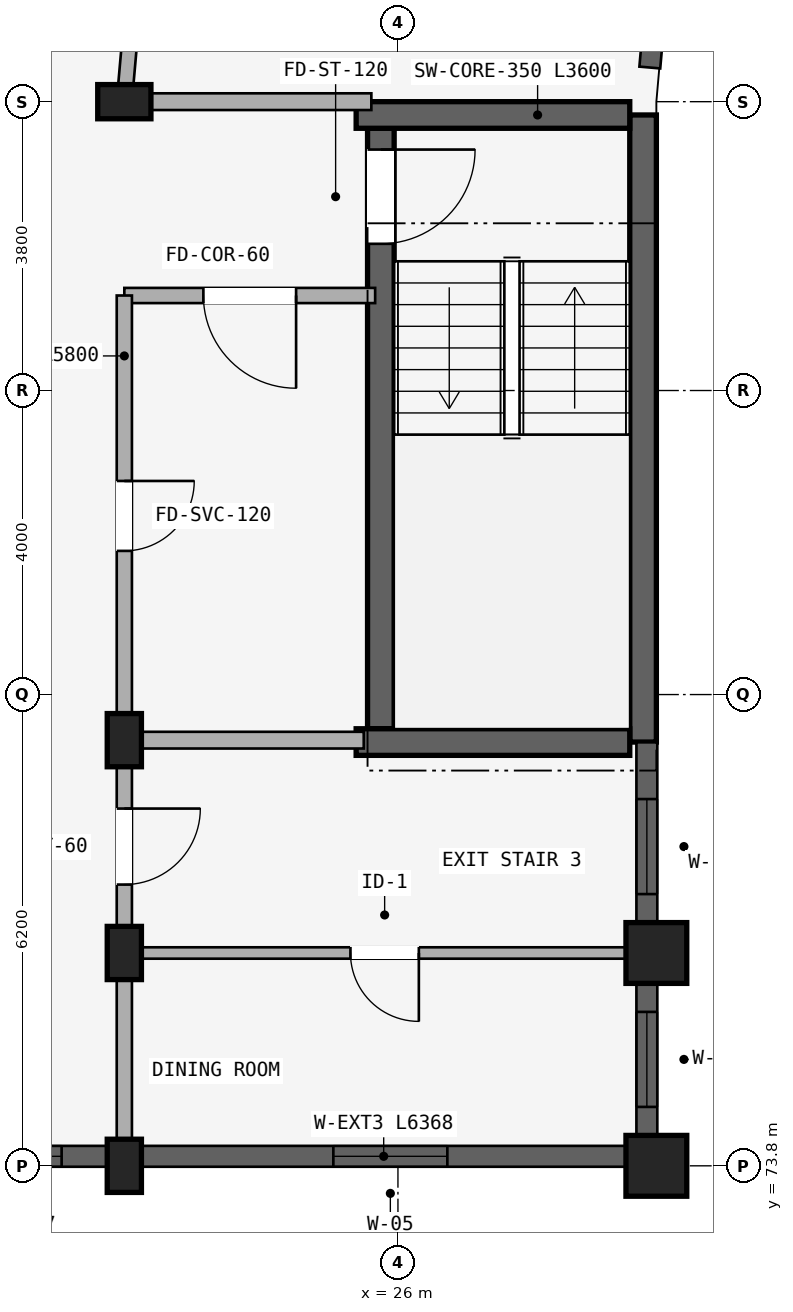
"""IFC4 building model, lengths in metres.
Left out: names, types, materials, properties, quantities, classifications, styles, units other than length and angle.
Written with IfcOpenShell. Run it as: python <this file> out.ifc"""

import sys

from ifc_helpers import new_model, si_unit, direction, frame, frame_2d, origin, origin_2d, place, context, subcontext, project, spatial, rectangle, extrude, element, fill, save


model = new_model("IFC4")
c1 = context("Model", 3, precision=1e-05, world=origin(), true_north=direction((0.0, 1.0)))
c2 = subcontext(c1, "Body", "Model", "MODEL_VIEW")
j1 = project(units=[si_unit("LENGTHUNIT", "METRE"), si_unit("PLANEANGLEUNIT", "RADIAN")], contexts=[c1])
p1 = place(None, origin())
s1 = spatial("IfcSite", under=j1, at=p1, CompositionType="ELEMENT")
p2 = place(p1, origin())
s2 = spatial("IfcBuilding", under=s1, at=p2, CompositionType="ELEMENT")
p3 = place(p2, frame((0.0, 0.0, 11.85)))
s3 = spatial("IfcBuildingStorey", under=s2, at=p3, CompositionType="ELEMENT", Elevation=11.85)
p4 = place(p3, frame((29.225, 87.625, 0.0), z_axis=(0.0, 0.0, 1.0), x_axis=(0.0, -1.0, 0.0)))
e1 = element("IfcWall", 1, at=p4, inside=s3, PredefinedType="SHEAR", context=c2, shape_type="SweptSolid", body=[
    extrude(rectangle(XDim=8.25, YDim=0.35, at=frame_2d((4.125, 0.0))), origin(), (0.0, 0.0, 1.0), 2.93),
])
p5 = place(p3, frame((25.775, 87.45, 0.0), z_axis=(0.0, 0.0, 1.0), x_axis=(0.0, -1.0, 0.0)))
e2 = element("IfcWall", 2, at=p5, inside=s3, PredefinedType="SHEAR", context=c2, shape_type="SweptSolid", body=[
    extrude(rectangle(XDim=7.9, YDim=0.35, at=frame_2d((3.95, 0.0))), origin(), (0.0, 0.0, 1.0), 2.93),
])
p6 = place(p5, frame((0.28, 0.0, 0.0)))
e3 = element("IfcOpeningElement", 3, at=p6, cuts=e2, PredefinedType="OPENING", context=c2, shape_type="SweptSolid", body=[
    extrude(rectangle(XDim=1.24, YDim=2.15, at=frame_2d((0.62, 1.075))), frame((0.0, 0.185, 0.0), z_axis=(0.0, -1.0, 0.0), x_axis=(1.0, 0.0, 0.0)), (0.0, 0.0, 1.0), 0.37),
])
for number, where, z_axis, x_axis in (
    (4, (29.05, 87.625, 0.0), (0.0, 0.0, 1.0), (-1.0, 0.0, 0.0)),
    (5, (29.05, 79.375, 0.0), (0.0, 0.0, 1.0), (-1.0, 0.0, 0.0)),
):
    element("IfcWall", number, at=place(p3, frame(where, z_axis=z_axis, x_axis=x_axis)), inside=s3, PredefinedType="SHEAR", context=c2, shape_type="SweptSolid", body=[
        extrude(rectangle(XDim=3.6, YDim=0.35, at=frame_2d((1.8, 0.0))), origin(), (0.0, 0.0, 1.0), 2.93),
    ])
for number, where, z_axis, x_axis in (
    (6, (22.4, 87.8, 0.0), (0.0, 0.0, 1.0), (0.0, 1.0, 0.0)),
    (7, (22.4, 79.4, 0.0), (0.0, 0.0, 1.0), (1.0, 0.0, 0.0)),
):
    element("IfcColumn", number, at=place(p3, frame(where, z_axis=z_axis, x_axis=x_axis)), inside=s3, PredefinedType="COLUMN", context=c2, shape_type="SweptSolid", body=[
        extrude(rectangle(XDim=0.45, YDim=0.7, at=origin_2d()), origin(), (0.0, 0.0, 1.0), 2.93),
    ])
p7 = place(p3, frame((29.4, 76.6, 0.0), z_axis=(0.0, 0.0, 1.0), x_axis=(1.0, 0.0, 0.0)))
e8 = element("IfcColumn", 8, at=p7, inside=s3, PredefinedType="COLUMN", context=c2, shape_type="SweptSolid", body=[
    extrude(rectangle(XDim=0.8, YDim=0.8, at=origin_2d()), origin(), (0.0, 0.0, 1.0), 2.93),
])
p8 = place(p3, frame((22.4, 76.6, 0.0), z_axis=(0.0, 0.0, 1.0), x_axis=(1.0, 0.0, 0.0)))
e9 = element("IfcColumn", 9, at=p8, inside=s3, PredefinedType="COLUMN", context=c2, shape_type="SweptSolid", body=[
    extrude(rectangle(XDim=0.45, YDim=0.7, at=origin_2d()), origin(), (0.0, 0.0, 1.0), 2.93),
])
p9 = place(p3, frame((29.4, 73.8, 0.0), z_axis=(0.0, 0.0, 1.0), x_axis=(1.0, 0.0, 0.0)))
e10 = element("IfcColumn", 10, at=p9, inside=s3, PredefinedType="COLUMN", context=c2, shape_type="SweptSolid", body=[
    extrude(rectangle(XDim=0.8, YDim=0.8, at=origin_2d()), origin(), (0.0, 0.0, 1.0), 2.93),
])
p10 = place(p3, frame((22.4, 73.8, 0.0), z_axis=(0.0, 0.0, 1.0), x_axis=(1.0, 0.0, 0.0)))
e11 = element("IfcColumn", 11, at=p10, inside=s3, PredefinedType="COLUMN", context=c2, shape_type="SweptSolid", body=[
    extrude(rectangle(XDim=0.45, YDim=0.7, at=origin_2d()), origin(), (0.0, 0.0, 1.0), 2.93),
])
p11 = place(p3, frame((25.7, 85.25, 0.0), z_axis=(0.0, 0.0, 1.0), x_axis=(-1.0, 0.0, 0.0)))
e12 = element("IfcWall", 12, at=p11, inside=s3, PredefinedType="STANDARD", context=c2, shape_type="SweptSolid", body=[
    extrude(rectangle(XDim=3.3, YDim=0.2, at=frame_2d((1.65, 0.0))), origin(), (0.0, 0.0, 1.0), 2.372),
])
p12 = place(p11, frame((1.04, 0.0, 0.0)))
e13 = element("IfcOpeningElement", 13, at=p12, cuts=e12, PredefinedType="OPENING", context=c2, shape_type="SweptSolid", body=[
    extrude(rectangle(XDim=1.22, YDim=2.15, at=frame_2d((0.61, 1.075))), frame((0.0, 0.11, 0.0), z_axis=(0.0, -1.0, 0.0), x_axis=(1.0, 0.0, 0.0)), (0.0, 0.0, 1.0), 0.22),
])
p13 = place(p3, frame((22.4, 85.25, 0.0), z_axis=(0.0, 0.0, 1.0), x_axis=(0.0, -1.0, 0.0)))
e14 = element("IfcWall", 14, at=p13, inside=s3, PredefinedType="STANDARD", context=c2, shape_type="SweptSolid", body=[
    extrude(rectangle(XDim=5.8, YDim=0.2, at=frame_2d((2.9, 0.0))), origin(), (0.0, 0.0, 1.0), 2.372),
])
p14 = place(p13, frame((2.44, 0.0, 0.0)))
e15 = element("IfcOpeningElement", 15, at=p14, cuts=e14, PredefinedType="OPENING", context=c2, shape_type="SweptSolid", body=[
    extrude(rectangle(XDim=0.92, YDim=2.1, at=frame_2d((0.46, 1.05))), frame((0.0, 0.11, 0.0), z_axis=(0.0, -1.0, 0.0), x_axis=(1.0, 0.0, 0.0)), (0.0, 0.0, 1.0), 0.22),
])
p15 = place(p3, frame((22.792, 92.28, 0.0), z_axis=(0.0, 0.0, 1.0), x_axis=(-0.087187153726, -0.996191949488, 0.0)))
e16 = element("IfcWall", 16, at=p15, inside=s3, PredefinedType="STANDARD", context=c2, shape_type="SweptSolid", body=[
    extrude(rectangle(XDim=4.497, YDim=0.2, at=frame_2d((2.249, 0.0))), origin(), (0.0, 0.0, 1.0), 2.372),
])
p16 = place(p3, frame((25.65, 87.8, 0.0), z_axis=(0.0, 0.0, 1.0), x_axis=(-1.0, 0.0, 0.0)))
e17 = element("IfcWall", 17, at=p16, inside=s3, PredefinedType="STANDARD", context=c2, shape_type="SweptSolid", body=[
    extrude(rectangle(XDim=3.2, YDim=0.22, at=frame_2d((1.6, 0.0))), origin(), (0.0, 0.0, 1.0), 2.372),
])
p17 = place(p3, frame((22.4, 79.4, 0.0), z_axis=(0.0, 0.0, 1.0), x_axis=(0.0, -1.0, 0.0)))
e18 = element("IfcWall", 18, at=p17, inside=s3, PredefinedType="STANDARD", context=c2, shape_type="SweptSolid", body=[
    extrude(rectangle(XDim=2.8, YDim=0.2, at=frame_2d((1.4, 0.0))), origin(), (0.0, 0.0, 1.0), 2.372),
])
p18 = place(p17, frame((0.9, 0.0, 0.0)))
e19 = element("IfcOpeningElement", 19, at=p18, cuts=e18, PredefinedType="OPENING", context=c2, shape_type="SweptSolid", body=[
    extrude(rectangle(XDim=1.0, YDim=2.15, at=frame_2d((0.5, 1.075))), frame((0.0, 0.11, 0.0), z_axis=(0.0, -1.0, 0.0), x_axis=(1.0, 0.0, 0.0)), (0.0, 0.0, 1.0), 0.22),
])
p19 = place(p3, frame((25.55, 79.4, 0.0), z_axis=(0.0, 0.0, 1.0), x_axis=(-1.0, 0.0, 0.0)))
e20 = element("IfcWall", 20, at=p19, inside=s3, PredefinedType="STANDARD", context=c2, shape_type="SweptSolid", body=[
    extrude(rectangle(XDim=3.1, YDim=0.22, at=frame_2d((1.55, 0.0))), origin(), (0.0, 0.0, 1.0), 2.372),
])
p20 = place(p3, frame((22.4, 76.6, 0.0), z_axis=(0.0, 0.0, 1.0), x_axis=(0.0, -1.0, 0.0)))
e21 = element("IfcWall", 21, at=p20, inside=s3, PredefinedType="STANDARD", context=c2, shape_type="SweptSolid", body=[
    extrude(rectangle(XDim=2.8, YDim=0.2, at=frame_2d((1.4, 0.0))), origin(), (0.0, 0.0, 1.0), 2.372),
])
p21 = place(p3, frame((29.2, 76.6, 0.0), z_axis=(0.0, 0.0, 1.0), x_axis=(-1.0, 0.0, 0.0)))
e22 = element("IfcWall", 22, at=p21, inside=s3, PredefinedType="PARTITIONING", context=c2, shape_type="SweptSolid", body=[
    extrude(rectangle(XDim=6.75, YDim=0.15, at=frame_2d((3.375, 0.0))), origin(), (0.0, 0.0, 1.0), 2.372),
])
p22 = place(p21, frame((2.925, 0.0, 0.0)))
e23 = element("IfcOpeningElement", 23, at=p22, cuts=e22, PredefinedType="OPENING", context=c2, shape_type="SweptSolid", body=[
    extrude(rectangle(XDim=0.9, YDim=2.1, at=frame_2d((0.45, 1.05))), frame((0.0, 0.085, 0.0), z_axis=(0.0, -1.0, 0.0), x_axis=(1.0, 0.0, 0.0)), (0.0, 0.0, 1.0), 0.17),
])
p23 = place(p3, frame((29.537, 90.797, 0.0), z_axis=(0.0, 0.0, 1.0), x_axis=(-0.08716102895, -0.996194235595, 0.0)))
e24 = element("IfcWall", 24, at=p23, inside=s3, PredefinedType="STANDARD", context=c2, shape_type="SweptSolid", body=[
    extrude(rectangle(XDim=2.557, YDim=0.275, at=frame_2d((1.279, 0.0))), origin(), (0.0, 0.0, 1.0), 2.422),
])
p24 = place(p23, frame((0.759, 0.0, 0.722)))
e25 = element("IfcOpeningElement", 25, at=p24, cuts=e24, PredefinedType="OPENING", context=c2, shape_type="SweptSolid", body=[
    extrude(rectangle(XDim=1.2, YDim=1.5, at=frame_2d((0.6, 0.75))), frame((0.0, 0.147, 0.0), z_axis=(0.0, -1.0, 0.0), x_axis=(1.0, 0.0, 0.0)), (0.0, 0.0, 1.0), 0.295),
])
p25 = place(p3, frame((29.275, 79.372, 0.0), z_axis=(0.0, 0.0, 1.0), x_axis=(0.0, -1.0, 0.0)))
e26 = element("IfcWall", 26, at=p25, inside=s3, PredefinedType="STANDARD", context=c2, shape_type="SweptSolid", body=[
    extrude(rectangle(XDim=2.368, YDim=0.275, at=frame_2d((1.184, 0.0))), origin(), (0.0, 0.0, 1.0), 2.472),
])
p26 = place(p25, frame((0.747, 0.0, 0.722)))
e27 = element("IfcOpeningElement", 27, at=p26, cuts=e26, PredefinedType="OPENING", context=c2, shape_type="SweptSolid", body=[
    extrude(rectangle(XDim=1.25, YDim=1.55, at=frame_2d((0.625, 0.775))), frame((0.0, 0.147, 0.0), z_axis=(0.0, -1.0, 0.0), x_axis=(1.0, 0.0, 0.0)), (0.0, 0.0, 1.0), 0.295),
])
p27 = place(p3, frame((29.275, 76.197, 0.0), z_axis=(0.0, 0.0, 1.0), x_axis=(0.0, -1.0, 0.0)))
e28 = element("IfcWall", 28, at=p27, inside=s3, PredefinedType="STANDARD", context=c2, shape_type="SweptSolid", body=[
    extrude(rectangle(XDim=1.993, YDim=0.275, at=frame_2d((0.997, 0.0))), origin(), (0.0, 0.0, 1.0), 2.472),
])
p28 = place(p27, frame((0.372, 0.0, 0.722)))
e29 = element("IfcOpeningElement", 29, at=p28, cuts=e28, PredefinedType="OPENING", context=c2, shape_type="SweptSolid", body=[
    extrude(rectangle(XDim=1.25, YDim=1.55, at=frame_2d((0.625, 0.775))), frame((0.0, 0.147, 0.0), z_axis=(0.0, -1.0, 0.0), x_axis=(1.0, 0.0, 0.0)), (0.0, 0.0, 1.0), 0.295),
])
p29 = place(p3, frame((28.997, 73.925, 0.0), z_axis=(0.0, 0.0, 1.0), x_axis=(-1.0, 0.0, 0.0)))
e30 = element("IfcWall", 30, at=p29, inside=s3, PredefinedType="STANDARD", context=c2, shape_type="SweptSolid", body=[
    extrude(rectangle(XDim=6.368, YDim=0.275, at=frame_2d((3.184, 0.0))), origin(), (0.0, 0.0, 1.0), 2.372),
])
p30 = place(p29, frame((2.346, 0.0, 0.522)))
e31 = element("IfcOpeningElement", 31, at=p30, cuts=e30, PredefinedType="OPENING", context=c2, shape_type="SweptSolid", body=[
    extrude(rectangle(XDim=1.5, YDim=1.65, at=frame_2d((0.75, 0.825))), frame((0.0, 0.147, 0.0), z_axis=(0.0, -1.0, 0.0), x_axis=(1.0, 0.0, 0.0)), (0.0, 0.0, 1.0), 0.295),
])
p31 = place(p3, frame((22.171, 73.925, 0.0), z_axis=(0.0, 0.0, 1.0), x_axis=(-1.0, 0.0, 0.0)))
e32 = element("IfcWall", 32, at=p31, inside=s3, PredefinedType="STANDARD", context=c2, shape_type="SweptSolid", body=[
    extrude(rectangle(XDim=1.943, YDim=0.275, at=frame_2d((0.971, 0.0))), origin(), (0.0, 0.0, 1.0), 2.372),
])
p32 = place(p31, frame((0.596, 0.0, 0.88)))
e33 = element("IfcOpeningElement", 33, at=p32, cuts=e32, PredefinedType="OPENING", context=c2, shape_type="SweptSolid", body=[
    extrude(rectangle(XDim=0.75, YDim=1.05, at=frame_2d((0.375, 0.525))), frame((0.0, 0.147, 0.0), z_axis=(0.0, -1.0, 0.0), x_axis=(1.0, 0.0, 0.0)), (0.0, 0.0, 1.0), 0.295),
])
p33 = place(p26, origin())
e34 = element("IfcWindow", 34, at=p33, inside=s3, PartitioningType="SINGLE_PANEL", PredefinedType="WINDOW", context=c2, shape_type="SweptSolid", body=[
    extrude(rectangle(XDim=1.25, YDim=1.55, at=frame_2d((0.625, 0.775))), frame((0.0, 0.03, 0.0), z_axis=(0.0, -1.0, 0.0), x_axis=(1.0, 0.0, 0.0)), (0.0, 0.0, 1.0), 0.06),
])
fill(e27, e34)
p34 = place(p28, origin())
e35 = element("IfcWindow", 35, at=p34, inside=s3, PartitioningType="SINGLE_PANEL", PredefinedType="WINDOW", context=c2, shape_type="SweptSolid", body=[
    extrude(rectangle(XDim=1.25, YDim=1.55, at=frame_2d((0.625, 0.775))), frame((0.0, 0.03, 0.0), z_axis=(0.0, -1.0, 0.0), x_axis=(1.0, 0.0, 0.0)), (0.0, 0.0, 1.0), 0.06),
])
fill(e29, e35)
p35 = place(p30, origin())
e36 = element("IfcWindow", 36, at=p35, inside=s3, PartitioningType="DOUBLE_PANEL_VERTICAL", PredefinedType="WINDOW", context=c2, shape_type="SweptSolid", body=[
    extrude(rectangle(XDim=1.5, YDim=1.65, at=frame_2d((0.75, 0.825))), frame((0.0, 0.03, 0.0), z_axis=(0.0, -1.0, 0.0), x_axis=(1.0, 0.0, 0.0)), (0.0, 0.0, 1.0), 0.06),
])
fill(e31, e36)
p36 = place(p32, origin())
e37 = element("IfcWindow", 37, at=p36, inside=s3, PartitioningType="SINGLE_PANEL", PredefinedType="WINDOW", context=c2, shape_type="SweptSolid", body=[
    extrude(rectangle(XDim=0.75, YDim=1.05, at=frame_2d((0.375, 0.525))), frame((0.0, 0.03, 0.0), z_axis=(0.0, -1.0, 0.0), x_axis=(1.0, 0.0, 0.0)), (0.0, 0.0, 1.0), 0.06),
])
fill(e33, e37)
p37 = place(p6, origin())
e38 = element("IfcDoor", 38, at=p37, inside=s3, OperationType="SINGLE_SWING_LEFT", PredefinedType="DOOR", context=c2, shape_type="SweptSolid", body=[
    extrude(rectangle(XDim=1.24, YDim=2.15, at=frame_2d((0.62, 1.075))), frame((0.0, 0.025, 0.0), z_axis=(0.0, -1.0, 0.0), x_axis=(1.0, 0.0, 0.0)), (0.0, 0.0, 1.0), 0.05),
])
fill(e3, e38)
p38 = place(p12, origin())
e39 = element("IfcDoor", 39, at=p38, inside=s3, OperationType="SINGLE_SWING_LEFT", PredefinedType="DOOR", context=c2, shape_type="SweptSolid", body=[
    extrude(rectangle(XDim=1.22, YDim=2.15, at=frame_2d((0.61, 1.075))), frame((0.0, 0.025, 0.0), z_axis=(0.0, -1.0, 0.0), x_axis=(1.0, 0.0, 0.0)), (0.0, 0.0, 1.0), 0.05),
])
fill(e13, e39)
p39 = place(p14, frame((0.92, 0.0, 0.0), z_axis=(0.0, 0.0, 1.0), x_axis=(-1.0, 0.0, 0.0)))
e40 = element("IfcDoor", 40, at=p39, inside=s3, OperationType="SINGLE_SWING_RIGHT", PredefinedType="DOOR", context=c2, shape_type="SweptSolid", body=[
    extrude(rectangle(XDim=0.92, YDim=2.1, at=frame_2d((0.46, 1.05))), frame((0.0, 0.025, 0.0), z_axis=(0.0, -1.0, 0.0), x_axis=(1.0, 0.0, 0.0)), (0.0, 0.0, 1.0), 0.05),
])
fill(e15, e40)
p40 = place(p18, origin())
e41 = element("IfcDoor", 41, at=p40, inside=s3, OperationType="SINGLE_SWING_LEFT", PredefinedType="DOOR", context=c2, shape_type="SweptSolid", body=[
    extrude(rectangle(XDim=1.0, YDim=2.15, at=frame_2d((0.5, 1.075))), frame((0.0, 0.025, 0.0), z_axis=(0.0, -1.0, 0.0), x_axis=(1.0, 0.0, 0.0)), (0.0, 0.0, 1.0), 0.05),
])
fill(e19, e41)
p41 = place(p22, origin())
e42 = element("IfcDoor", 42, at=p41, inside=s3, OperationType="SINGLE_SWING_LEFT", PredefinedType="DOOR", context=c2, shape_type="SweptSolid", body=[
    extrude(rectangle(XDim=0.9, YDim=2.1, at=frame_2d((0.45, 1.05))), frame((0.0, 0.025, 0.0), z_axis=(0.0, -1.0, 0.0), x_axis=(1.0, 0.0, 0.0)), (0.0, 0.0, 1.0), 0.05),
])
fill(e23, e42)
save(model, sys.argv[1])
